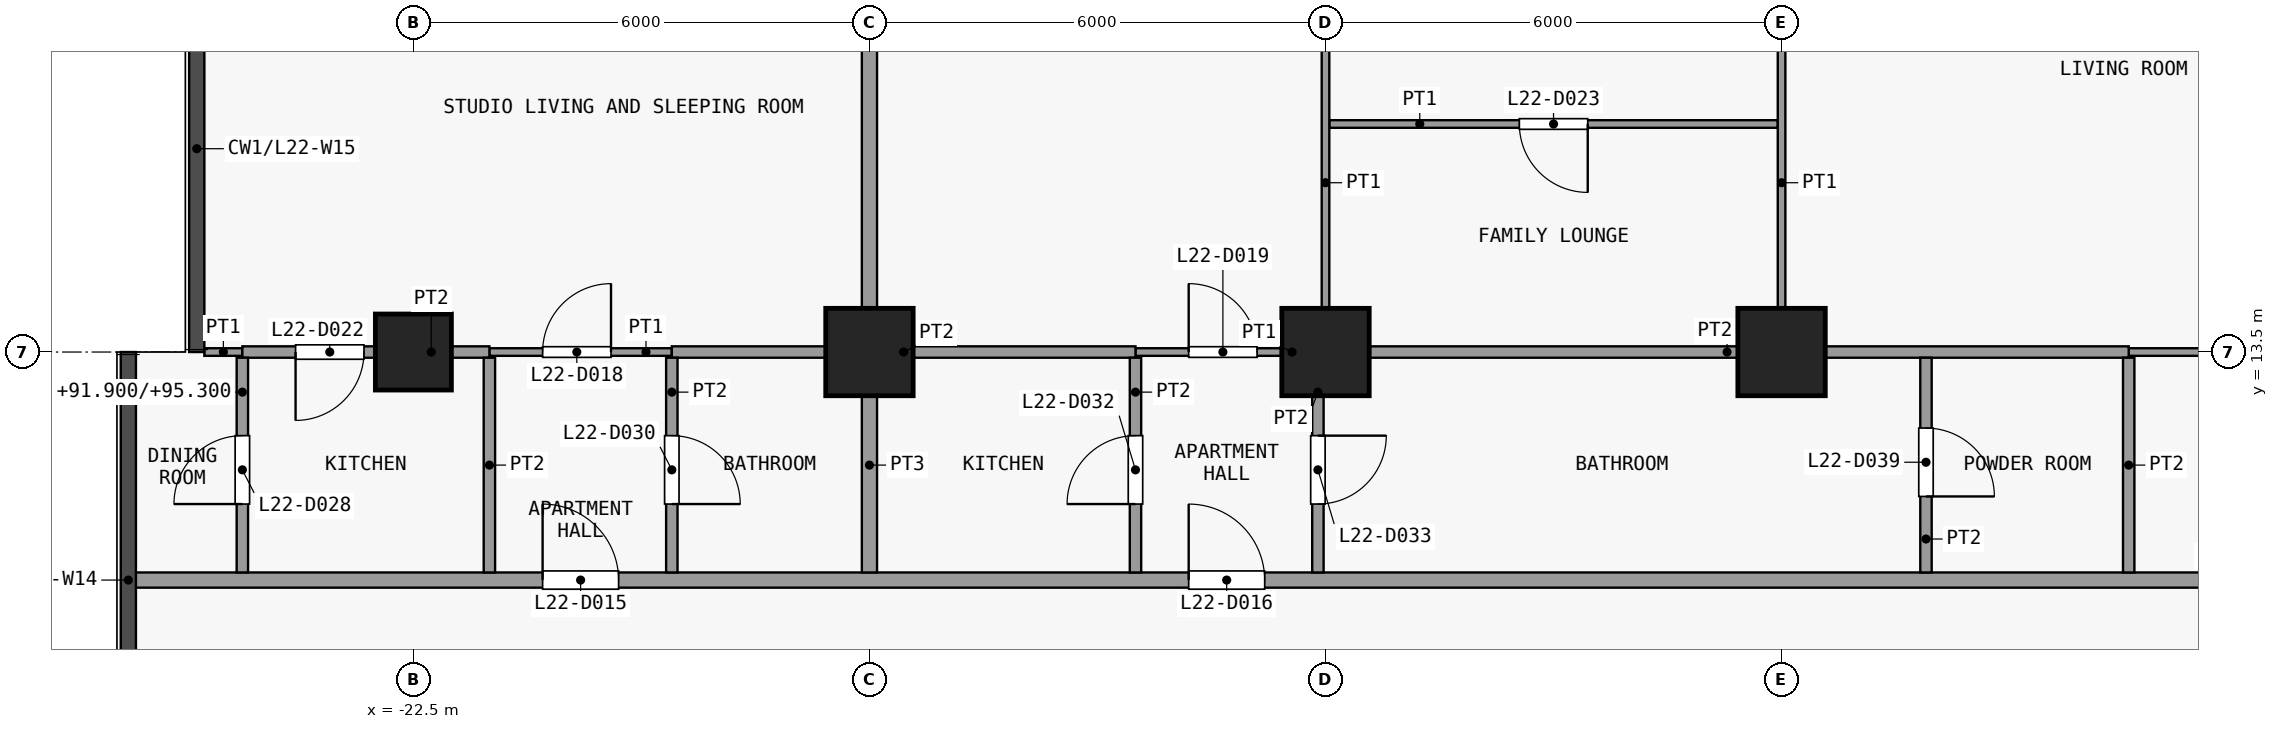
"""IFC4 building model, lengths in metres.
Left out: names, types, materials, properties, quantities, classifications, styles, units other than length and angle.
Written with IfcOpenShell. Run it as: python <this file> out.ifc"""

import sys

from ifc_helpers import new_model, si_unit, direction, frame, frame_2d, origin, origin_2d, place, context, subcontext, project, spatial, rectangle, extrude, element, fill, save


model = new_model("IFC4")
c1 = context("Model", 3, precision=1e-05, world=origin(), true_north=direction((0.0, 1.0)))
c2 = subcontext(c1, "Body", "Model", "MODEL_VIEW")
j1 = project(units=[si_unit("LENGTHUNIT", "METRE"), si_unit("PLANEANGLEUNIT", "RADIAN")], contexts=[c1])
p1 = place(None, origin())
s1 = spatial("IfcSite", under=j1, at=p1, CompositionType="ELEMENT")
p2 = place(p1, origin())
s2 = spatial("IfcBuilding", under=s1, at=p2, CompositionType="ELEMENT")
p3 = place(p2, frame((0.0, 0.0, 91.9)))
s3 = spatial("IfcBuildingStorey", under=s2, at=p3, CompositionType="ELEMENT", Elevation=91.9)
p4 = place(p3, frame((-22.5, 13.5, 0.0), z_axis=(0.0, 0.0, 1.0), x_axis=(1.0, 0.0, 0.0)))
e1 = element("IfcColumn", 1, at=p4, inside=s3, PredefinedType="COLUMN", context=c2, shape_type="SweptSolid", body=[
    extrude(rectangle(XDim=1.0, YDim=1.0, at=origin_2d()), origin(), (0.0, 0.0, 1.0), 3.6),
])
for number, where, z_axis, x_axis in (
    (2, (-16.5, 13.5, 0.0), (0.0, 0.0, 1.0), (1.0, 0.0, 0.0)),
    (3, (-10.5, 13.5, 0.0), (0.0, 0.0, 1.0), (1.0, 0.0, 0.0)),
    (4, (-4.5, 13.5, 0.0), (0.0, 0.0, 1.0), (1.0, 0.0, 0.0)),
):
    element("IfcColumn", number, at=place(p3, frame(where, z_axis=z_axis, x_axis=x_axis)), inside=s3, PredefinedType="COLUMN", context=c2, shape_type="SweptSolid", body=[
        extrude(rectangle(XDim=1.15, YDim=1.15, at=origin_2d()), origin(), (0.0, 0.0, 1.0), 3.6),
    ])
p5 = place(p3, frame((-26.25, 10.5, 0.0), z_axis=(0.0, 0.0, 1.0), x_axis=(1.0, 0.0, 0.0)))
e5 = element("IfcWall", 5, at=p5, inside=s3, PredefinedType="PARTITIONING", context=c2, shape_type="SweptSolid", body=[
    extrude(rectangle(XDim=50.1, YDim=0.2, at=frame_2d((25.05, 0.0))), origin(), (0.0, 0.0, 1.0), 3.3),
])
p6 = place(p5, frame((5.45, 0.0, 0.0)))
e6 = element("IfcOpeningElement", 6, at=p6, cuts=e5, PredefinedType="OPENING", context=c2, shape_type="SweptSolid", body=[
    extrude(rectangle(XDim=1.0, YDim=2.1, at=frame_2d((0.5, 1.05))), frame((0.0, 0.11, 0.0), z_axis=(0.0, -1.0, 0.0), x_axis=(1.0, 0.0, 0.0)), (0.0, 0.0, 1.0), 0.22),
])
p7 = place(p5, frame((13.95, 0.0, 0.0)))
e7 = element("IfcOpeningElement", 7, at=p7, cuts=e5, PredefinedType="OPENING", context=c2, shape_type="SweptSolid", body=[
    extrude(rectangle(XDim=1.0, YDim=2.1, at=frame_2d((0.5, 1.05))), frame((0.0, 0.11, 0.0), z_axis=(0.0, -1.0, 0.0), x_axis=(1.0, 0.0, 0.0)), (0.0, 0.0, 1.0), 0.22),
])
p8 = place(p5, frame((39.95, 0.0, 0.0)))
e8 = element("IfcOpeningElement", 8, at=p8, cuts=e5, PredefinedType="OPENING", context=c2, shape_type="SweptSolid", body=[
    extrude(rectangle(XDim=1.0, YDim=2.1, at=frame_2d((0.5, 1.05))), frame((0.0, 0.11, 0.0), z_axis=(0.0, -1.0, 0.0), x_axis=(1.0, 0.0, 0.0)), (0.0, 0.0, 1.0), 0.22),
])
p9 = place(p3, frame((-25.25, 13.5, 0.0), z_axis=(0.0, 0.0, 1.0), x_axis=(1.0, 0.0, 0.0)))
e9 = element("IfcWall", 9, at=p9, inside=s3, PredefinedType="PARTITIONING", context=c2, shape_type="SweptSolid", body=[
    extrude(rectangle(XDim=0.5, YDim=0.1, at=frame_2d((0.25, 0.0))), origin(), (0.0, 0.0, 1.0), 3.3),
])
p10 = place(p3, frame((-21.5, 13.5, 0.0), z_axis=(0.0, 0.0, 1.0), x_axis=(1.0, 0.0, 0.0)))
e10 = element("IfcWall", 10, at=p10, inside=s3, PredefinedType="PARTITIONING", context=c2, shape_type="SweptSolid", body=[
    extrude(rectangle(XDim=2.4, YDim=0.1, at=frame_2d((1.2, 0.0))), origin(), (0.0, 0.0, 1.0), 3.3),
])
p11 = place(p10, frame((0.7, 0.0, 0.0)))
e11 = element("IfcOpeningElement", 11, at=p11, cuts=e10, PredefinedType="OPENING", context=c2, shape_type="SweptSolid", body=[
    extrude(rectangle(XDim=0.9, YDim=2.1, at=frame_2d((0.45, 1.05))), frame((0.0, 0.06, 0.0), z_axis=(0.0, -1.0, 0.0), x_axis=(1.0, 0.0, 0.0)), (0.0, 0.0, 1.0), 0.12),
])
p12 = place(p3, frame((-13.0, 13.5, 0.0), z_axis=(0.0, 0.0, 1.0), x_axis=(1.0, 0.0, 0.0)))
e12 = element("IfcWall", 12, at=p12, inside=s3, PredefinedType="PARTITIONING", context=c2, shape_type="SweptSolid", body=[
    extrude(rectangle(XDim=2.4, YDim=0.1, at=frame_2d((1.2, 0.0))), origin(), (0.0, 0.0, 1.0), 3.3),
])
p13 = place(p12, frame((0.7, 0.0, 0.0)))
e13 = element("IfcOpeningElement", 13, at=p13, cuts=e12, PredefinedType="OPENING", context=c2, shape_type="SweptSolid", body=[
    extrude(rectangle(XDim=0.9, YDim=2.1, at=frame_2d((0.45, 1.05))), frame((0.0, 0.06, 0.0), z_axis=(0.0, -1.0, 0.0), x_axis=(1.0, 0.0, 0.0)), (0.0, 0.0, 1.0), 0.12),
])
p14 = place(p3, frame((0.067, 13.5, 0.0), z_axis=(0.0, 0.0, 1.0), x_axis=(1.0, 0.0, 0.0)))
e14 = element("IfcWall", 14, at=p14, inside=s3, PredefinedType="PARTITIONING", context=c2, shape_type="SweptSolid", body=[
    extrude(rectangle(XDim=7.733, YDim=0.1, at=frame_2d((3.867, 0.0))), origin(), (0.0, 0.0, 1.0), 3.3),
])
p15 = place(p14, frame((1.8, 0.0, 0.0)))
e15 = element("IfcOpeningElement", 15, at=p15, cuts=e14, PredefinedType="OPENING", context=c2, shape_type="SweptSolid", body=[
    extrude(rectangle(XDim=0.9, YDim=2.1, at=frame_2d((0.45, 1.05))), frame((0.0, 0.06, 0.0), z_axis=(0.0, -1.0, 0.0), x_axis=(1.0, 0.0, 0.0)), (0.0, 0.0, 1.0), 0.12),
])
p16 = place(p3, frame((-24.75, 13.5, 0.0), z_axis=(0.0, 0.0, 1.0), x_axis=(1.0, 0.0, 0.0)))
e16 = element("IfcWall", 16, at=p16, inside=s3, PredefinedType="PARTITIONING", context=c2, shape_type="SweptSolid", body=[
    extrude(rectangle(XDim=3.25, YDim=0.15, at=frame_2d((1.625, 0.0))), origin(), (0.0, 0.0, 1.0), 3.3),
])
p17 = place(p16, frame((0.7, 0.0, 0.0)))
e17 = element("IfcOpeningElement", 17, at=p17, cuts=e16, PredefinedType="OPENING", context=c2, shape_type="SweptSolid", body=[
    extrude(rectangle(XDim=0.9, YDim=2.1, at=frame_2d((0.45, 1.05))), frame((0.0, 0.085, 0.0), z_axis=(0.0, -1.0, 0.0), x_axis=(1.0, 0.0, 0.0)), (0.0, 0.0, 1.0), 0.17),
])
p18 = place(p3, frame((-19.1, 13.5, 0.0), z_axis=(0.0, 0.0, 1.0), x_axis=(1.0, 0.0, 0.0)))
e18 = element("IfcWall", 18, at=p18, inside=s3, PredefinedType="PARTITIONING", context=c2, shape_type="SweptSolid", body=[
    extrude(rectangle(XDim=6.1, YDim=0.15, at=frame_2d((3.05, 0.0))), origin(), (0.0, 0.0, 1.0), 3.3),
])
p19 = place(p3, frame((-10.5, 13.5, 0.0), z_axis=(0.0, 0.0, 1.0), x_axis=(1.0, 0.0, 0.0)))
e19 = element("IfcWall", 19, at=p19, inside=s3, PredefinedType="PARTITIONING", context=c2, shape_type="SweptSolid", body=[
    extrude(rectangle(XDim=10.567, YDim=0.15, at=frame_2d((5.283, 0.0))), origin(), (0.0, 0.0, 1.0), 3.3),
])
p20 = place(p3, frame((-10.45, 16.5, 0.0), z_axis=(0.0, 0.0, 1.0), x_axis=(1.0, 0.0, 0.0)))
e20 = element("IfcWall", 20, at=p20, inside=s3, PredefinedType="PARTITIONING", context=c2, shape_type="SweptSolid", body=[
    extrude(rectangle(XDim=5.9, YDim=0.1, at=frame_2d((2.95, 0.0))), origin(), (0.0, 0.0, 1.0), 3.3),
])
p21 = place(p20, frame((2.5, 0.0, 0.0)))
e21 = element("IfcOpeningElement", 21, at=p21, cuts=e20, PredefinedType="OPENING", context=c2, shape_type="SweptSolid", body=[
    extrude(rectangle(XDim=0.9, YDim=2.1, at=frame_2d((0.45, 1.05))), frame((0.0, 0.06, 0.0), z_axis=(0.0, -1.0, 0.0), x_axis=(1.0, 0.0, 0.0)), (0.0, 0.0, 1.0), 0.12),
])
p22 = place(p3, frame((-24.75, 10.6, 0.0), z_axis=(0.0, 0.0, 1.0), x_axis=(0.0, 1.0, 0.0)))
e22 = element("IfcWall", 22, at=p22, inside=s3, PredefinedType="PARTITIONING", context=c2, shape_type="SweptSolid", body=[
    extrude(rectangle(XDim=2.825, YDim=0.15, at=frame_2d((1.413, 0.0))), origin(), (0.0, 0.0, 1.0), 3.4),
])
p23 = place(p22, frame((0.9, 0.0, 0.0)))
e23 = element("IfcOpeningElement", 23, at=p23, cuts=e22, PredefinedType="OPENING", context=c2, shape_type="SweptSolid", body=[
    extrude(rectangle(XDim=0.9, YDim=2.1, at=frame_2d((0.45, 1.05))), frame((0.0, 0.085, 0.0), z_axis=(0.0, -1.0, 0.0), x_axis=(1.0, 0.0, 0.0)), (0.0, 0.0, 1.0), 0.17),
])
p24 = place(p3, frame((-21.5, 10.6, 0.0), z_axis=(0.0, 0.0, 1.0), x_axis=(0.0, 1.0, 0.0)))
e24 = element("IfcWall", 24, at=p24, inside=s3, PredefinedType="PARTITIONING", context=c2, shape_type="SweptSolid", body=[
    extrude(rectangle(XDim=2.825, YDim=0.15, at=frame_2d((1.413, 0.0))), origin(), (0.0, 0.0, 1.0), 3.3),
])
p25 = place(p3, frame((-19.1, 10.6, 0.0), z_axis=(0.0, 0.0, 1.0), x_axis=(0.0, 1.0, 0.0)))
e25 = element("IfcWall", 25, at=p25, inside=s3, PredefinedType="PARTITIONING", context=c2, shape_type="SweptSolid", body=[
    extrude(rectangle(XDim=2.825, YDim=0.15, at=frame_2d((1.413, 0.0))), origin(), (0.0, 0.0, 1.0), 3.3),
])
p26 = place(p25, frame((0.9, 0.0, 0.0)))
e26 = element("IfcOpeningElement", 26, at=p26, cuts=e25, PredefinedType="OPENING", context=c2, shape_type="SweptSolid", body=[
    extrude(rectangle(XDim=0.9, YDim=2.1, at=frame_2d((0.45, 1.05))), frame((0.0, 0.085, 0.0), z_axis=(0.0, -1.0, 0.0), x_axis=(1.0, 0.0, 0.0)), (0.0, 0.0, 1.0), 0.17),
])
p27 = place(p3, frame((-16.5, 10.6, 0.0), z_axis=(0.0, 0.0, 1.0), x_axis=(0.0, 1.0, 0.0)))
e27 = element("IfcWall", 27, at=p27, inside=s3, PredefinedType="PARTITIONING", context=c2, shape_type="SweptSolid", body=[
    extrude(rectangle(XDim=2.825, YDim=0.2, at=frame_2d((1.413, 0.0))), origin(), (0.0, 0.0, 1.0), 3.3),
])
p28 = place(p3, frame((-16.5, 13.575, 0.0), z_axis=(0.0, 0.0, 1.0), x_axis=(0.0, 1.0, 0.0)))
e28 = element("IfcWall", 28, at=p28, inside=s3, PredefinedType="PARTITIONING", context=c2, shape_type="SweptSolid", body=[
    extrude(rectangle(XDim=8.675, YDim=0.2, at=frame_2d((4.337, 0.0))), origin(), (0.0, 0.0, 1.0), 3.3),
])
p29 = place(p3, frame((-13.0, 10.6, 0.0), z_axis=(0.0, 0.0, 1.0), x_axis=(0.0, 1.0, 0.0)))
e29 = element("IfcWall", 29, at=p29, inside=s3, PredefinedType="PARTITIONING", context=c2, shape_type="SweptSolid", body=[
    extrude(rectangle(XDim=2.825, YDim=0.15, at=frame_2d((1.413, 0.0))), origin(), (0.0, 0.0, 1.0), 3.3),
])
p30 = place(p29, frame((0.9, 0.0, 0.0)))
e30 = element("IfcOpeningElement", 30, at=p30, cuts=e29, PredefinedType="OPENING", context=c2, shape_type="SweptSolid", body=[
    extrude(rectangle(XDim=0.9, YDim=2.1, at=frame_2d((0.45, 1.05))), frame((0.0, 0.085, 0.0), z_axis=(0.0, -1.0, 0.0), x_axis=(1.0, 0.0, 0.0)), (0.0, 0.0, 1.0), 0.17),
])
p31 = place(p3, frame((-10.6, 10.6, 0.0), z_axis=(0.0, 0.0, 1.0), x_axis=(0.0, 1.0, 0.0)))
e31 = element("IfcWall", 31, at=p31, inside=s3, PredefinedType="PARTITIONING", context=c2, shape_type="SweptSolid", body=[
    extrude(rectangle(XDim=2.825, YDim=0.15, at=frame_2d((1.413, 0.0))), origin(), (0.0, 0.0, 1.0), 3.3),
])
p32 = place(p31, frame((0.9, 0.0, 0.0)))
e32 = element("IfcOpeningElement", 32, at=p32, cuts=e31, PredefinedType="OPENING", context=c2, shape_type="SweptSolid", body=[
    extrude(rectangle(XDim=0.9, YDim=2.1, at=frame_2d((0.45, 1.05))), frame((0.0, 0.085, 0.0), z_axis=(0.0, -1.0, 0.0), x_axis=(1.0, 0.0, 0.0)), (0.0, 0.0, 1.0), 0.17),
])
p33 = place(p3, frame((-10.5, 13.575, 0.0), z_axis=(0.0, 0.0, 1.0), x_axis=(0.0, 1.0, 0.0)))
e33 = element("IfcWall", 33, at=p33, inside=s3, PredefinedType="PARTITIONING", context=c2, shape_type="SweptSolid", body=[
    extrude(rectangle(XDim=8.675, YDim=0.1, at=frame_2d((4.337, 0.0))), origin(), (0.0, 0.0, 1.0), 3.3),
])
p34 = place(p33, frame((4.425, 0.0, 0.0)))
e34 = element("IfcOpeningElement", 34, at=p34, cuts=e33, PredefinedType="OPENING", context=c2, shape_type="SweptSolid", body=[
    extrude(rectangle(XDim=0.9, YDim=2.1, at=frame_2d((0.45, 1.05))), frame((0.0, 0.06, 0.0), z_axis=(0.0, -1.0, 0.0), x_axis=(1.0, 0.0, 0.0)), (0.0, 0.0, 1.0), 0.12),
])
p35 = place(p3, frame((-4.5, 13.575, 0.0), z_axis=(0.0, 0.0, 1.0), x_axis=(0.0, 1.0, 0.0)))
e35 = element("IfcWall", 35, at=p35, inside=s3, PredefinedType="PARTITIONING", context=c2, shape_type="SweptSolid", body=[
    extrude(rectangle(XDim=7.275, YDim=0.1, at=frame_2d((3.638, 0.0))), origin(), (0.0, 0.0, 1.0), 3.3),
])
p36 = place(p35, frame((4.425, 0.0, 0.0)))
e36 = element("IfcOpeningElement", 36, at=p36, cuts=e35, PredefinedType="OPENING", context=c2, shape_type="SweptSolid", body=[
    extrude(rectangle(XDim=0.9, YDim=2.1, at=frame_2d((0.45, 1.05))), frame((0.0, 0.06, 0.0), z_axis=(0.0, -1.0, 0.0), x_axis=(1.0, 0.0, 0.0)), (0.0, 0.0, 1.0), 0.12),
])
p37 = place(p3, frame((-2.6, 10.6, 0.0), z_axis=(0.0, 0.0, 1.0), x_axis=(0.0, 1.0, 0.0)))
e37 = element("IfcWall", 37, at=p37, inside=s3, PredefinedType="PARTITIONING", context=c2, shape_type="SweptSolid", body=[
    extrude(rectangle(XDim=2.825, YDim=0.15, at=frame_2d((1.413, 0.0))), origin(), (0.0, 0.0, 1.0), 3.3),
])
p38 = place(p37, frame((1.0, 0.0, 0.0)))
e38 = element("IfcOpeningElement", 38, at=p38, cuts=e37, PredefinedType="OPENING", context=c2, shape_type="SweptSolid", body=[
    extrude(rectangle(XDim=0.9, YDim=2.1, at=frame_2d((0.45, 1.05))), frame((0.0, 0.085, 0.0), z_axis=(0.0, -1.0, 0.0), x_axis=(1.0, 0.0, 0.0)), (0.0, 0.0, 1.0), 0.17),
])
p39 = place(p3, frame((0.067, 10.6, 0.0), z_axis=(0.0, 0.0, 1.0), x_axis=(0.0, 1.0, 0.0)))
e39 = element("IfcWall", 39, at=p39, inside=s3, PredefinedType="PARTITIONING", context=c2, shape_type="SweptSolid", body=[
    extrude(rectangle(XDim=2.825, YDim=0.15, at=frame_2d((1.413, 0.0))), origin(), (0.0, 0.0, 1.0), 3.3),
])
p40 = place(p6, origin())
e40 = element("IfcDoor", 40, at=p40, inside=s3, OperationType="SINGLE_SWING_RIGHT", PredefinedType="DOOR", context=c2, shape_type="SweptSolid", body=[
    extrude(rectangle(XDim=1.0, YDim=2.1, at=frame_2d((0.5, 1.05))), frame((0.0, 0.025, 0.0), z_axis=(0.0, -1.0, 0.0), x_axis=(1.0, 0.0, 0.0)), (0.0, 0.0, 1.0), 0.05),
])
fill(e6, e40)
p41 = place(p7, origin())
e41 = element("IfcDoor", 41, at=p41, inside=s3, OperationType="SINGLE_SWING_RIGHT", PredefinedType="DOOR", context=c2, shape_type="SweptSolid", body=[
    extrude(rectangle(XDim=1.0, YDim=2.1, at=frame_2d((0.5, 1.05))), frame((0.0, 0.025, 0.0), z_axis=(0.0, -1.0, 0.0), x_axis=(1.0, 0.0, 0.0)), (0.0, 0.0, 1.0), 0.05),
])
fill(e7, e41)
p42 = place(p11, origin())
e42 = element("IfcDoor", 42, at=p42, inside=s3, OperationType="SINGLE_SWING_LEFT", PredefinedType="DOOR", context=c2, shape_type="SweptSolid", body=[
    extrude(rectangle(XDim=0.9, YDim=2.1, at=frame_2d((0.45, 1.05))), frame((0.0, 0.025, 0.0), z_axis=(0.0, -1.0, 0.0), x_axis=(1.0, 0.0, 0.0)), (0.0, 0.0, 1.0), 0.05),
])
fill(e11, e42)
p43 = place(p13, origin())
e43 = element("IfcDoor", 43, at=p43, inside=s3, OperationType="SINGLE_SWING_RIGHT", PredefinedType="DOOR", context=c2, shape_type="SweptSolid", body=[
    extrude(rectangle(XDim=0.9, YDim=2.1, at=frame_2d((0.45, 1.05))), frame((0.0, 0.025, 0.0), z_axis=(0.0, -1.0, 0.0), x_axis=(1.0, 0.0, 0.0)), (0.0, 0.0, 1.0), 0.05),
])
fill(e13, e43)
p44 = place(p17, origin())
e44 = element("IfcDoor", 44, at=p44, inside=s3, OperationType="SINGLE_SWING_LEFT", PredefinedType="DOOR", context=c2, shape_type="SweptSolid", body=[
    extrude(rectangle(XDim=0.9, YDim=2.1, at=frame_2d((0.45, 1.05))), frame((0.0, 0.025, 0.0), z_axis=(0.0, -1.0, 0.0), x_axis=(1.0, 0.0, 0.0)), (0.0, 0.0, 1.0), 0.05),
])
fill(e17, e44)
p45 = place(p21, origin())
e45 = element("IfcDoor", 45, at=p45, inside=s3, OperationType="SINGLE_SWING_RIGHT", PredefinedType="DOOR", context=c2, shape_type="SweptSolid", body=[
    extrude(rectangle(XDim=0.9, YDim=2.1, at=frame_2d((0.45, 1.05))), frame((0.0, 0.025, 0.0), z_axis=(0.0, -1.0, 0.0), x_axis=(1.0, 0.0, 0.0)), (0.0, 0.0, 1.0), 0.05),
])
fill(e21, e45)
p46 = place(p23, origin())
e46 = element("IfcDoor", 46, at=p46, inside=s3, OperationType="SINGLE_SWING_RIGHT", PredefinedType="DOOR", context=c2, shape_type="SweptSolid", body=[
    extrude(rectangle(XDim=0.9, YDim=2.1, at=frame_2d((0.45, 1.05))), frame((0.0, 0.025, 0.0), z_axis=(0.0, -1.0, 0.0), x_axis=(1.0, 0.0, 0.0)), (0.0, 0.0, 1.0), 0.05),
])
fill(e23, e46)
p47 = place(p26, origin())
e47 = element("IfcDoor", 47, at=p47, inside=s3, OperationType="SINGLE_SWING_LEFT", PredefinedType="DOOR", context=c2, shape_type="SweptSolid", body=[
    extrude(rectangle(XDim=0.9, YDim=2.1, at=frame_2d((0.45, 1.05))), frame((0.0, 0.025, 0.0), z_axis=(0.0, -1.0, 0.0), x_axis=(1.0, 0.0, 0.0)), (0.0, 0.0, 1.0), 0.05),
])
fill(e26, e47)
p48 = place(p30, origin())
e48 = element("IfcDoor", 48, at=p48, inside=s3, OperationType="SINGLE_SWING_RIGHT", PredefinedType="DOOR", context=c2, shape_type="SweptSolid", body=[
    extrude(rectangle(XDim=0.9, YDim=2.1, at=frame_2d((0.45, 1.05))), frame((0.0, 0.025, 0.0), z_axis=(0.0, -1.0, 0.0), x_axis=(1.0, 0.0, 0.0)), (0.0, 0.0, 1.0), 0.05),
])
fill(e30, e48)
p49 = place(p32, origin())
e49 = element("IfcDoor", 49, at=p49, inside=s3, OperationType="SINGLE_SWING_RIGHT", PredefinedType="DOOR", context=c2, shape_type="SweptSolid", body=[
    extrude(rectangle(XDim=0.9, YDim=2.1, at=frame_2d((0.45, 1.05))), frame((0.0, 0.025, 0.0), z_axis=(0.0, -1.0, 0.0), x_axis=(1.0, 0.0, 0.0)), (0.0, 0.0, 1.0), 0.05),
])
fill(e32, e49)
p50 = place(p38, origin())
e50 = element("IfcDoor", 50, at=p50, inside=s3, OperationType="SINGLE_SWING_LEFT", PredefinedType="DOOR", context=c2, shape_type="SweptSolid", body=[
    extrude(rectangle(XDim=0.9, YDim=2.1, at=frame_2d((0.45, 1.05))), frame((0.0, 0.025, 0.0), z_axis=(0.0, -1.0, 0.0), x_axis=(1.0, 0.0, 0.0)), (0.0, 0.0, 1.0), 0.05),
])
fill(e38, e50)
save(model, sys.argv[1])
